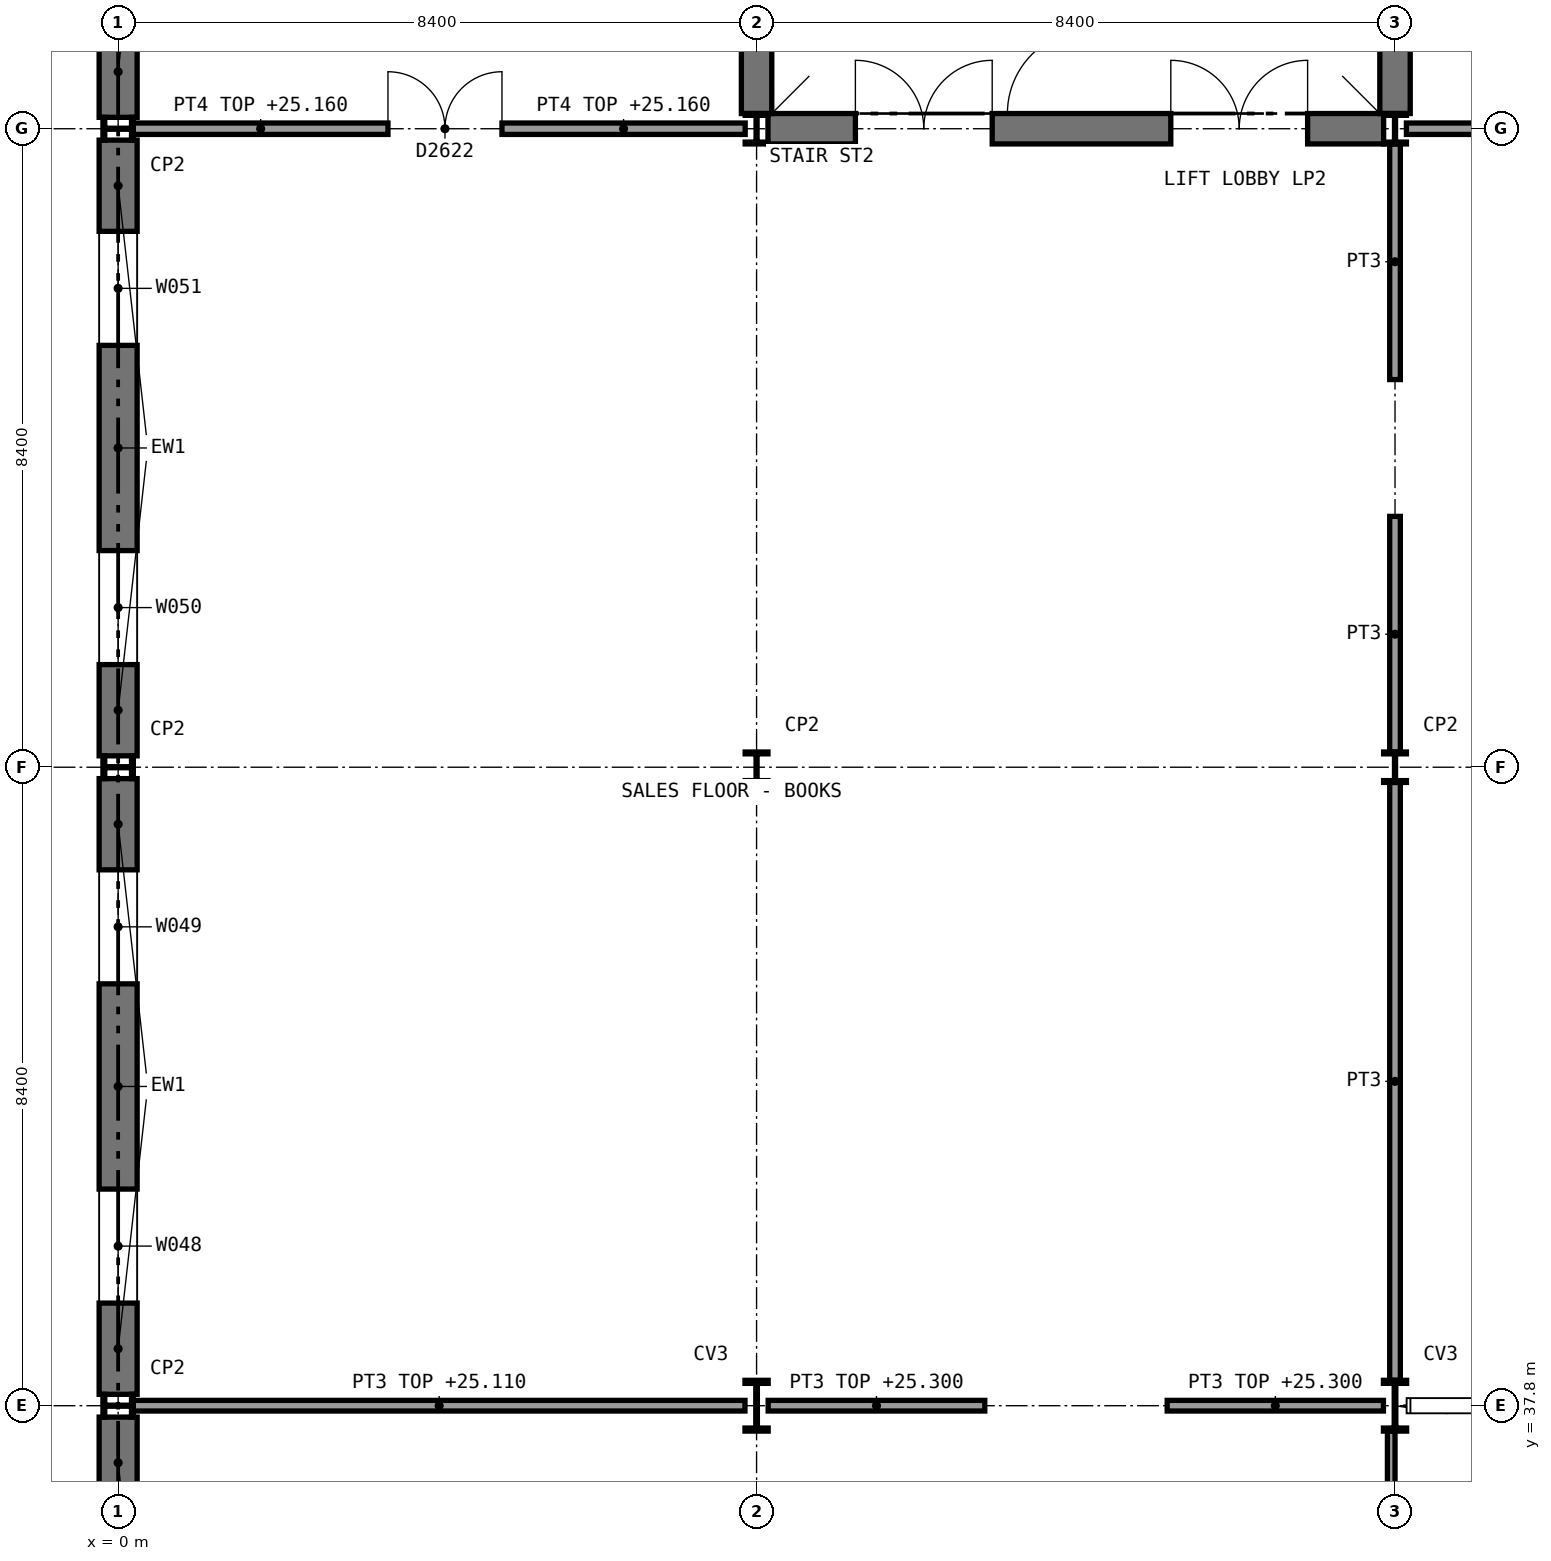
"""IFC4 building model, lengths in metres.
Left out: names, types, materials, properties, quantities, classifications, styles, units other than length and angle.
Written with IfcOpenShell. Run it as: python <this file> out.ifc"""

import sys

from ifc_helpers import new_model, si_unit, direction, frame, frame_2d, origin, origin_2d, place, context, subcontext, project, spatial, rectangle, i_section, extrude, element, fill, save


model = new_model("IFC4")
c1 = context("Model", 3, precision=1e-05, world=origin(), true_north=direction((0.0, 1.0)))
c2 = subcontext(c1, "Body", "Model", "MODEL_VIEW")
j1 = project(units=[si_unit("LENGTHUNIT", "METRE"), si_unit("PLANEANGLEUNIT", "RADIAN")], contexts=[c1])
p1 = place(None, origin())
s1 = spatial("IfcSite", under=j1, at=p1, CompositionType="ELEMENT")
p2 = place(p1, origin())
s2 = spatial("IfcBuilding", under=s1, at=p2, CompositionType="ELEMENT")
p3 = place(p2, frame((0.0, 0.0, 21.0)))
s3 = spatial("IfcBuildingStorey", under=s2, at=p3, CompositionType="ELEMENT", Elevation=21.0)
p4 = place(p3, frame((8.55, 54.6, 0.0), z_axis=(0.0, 0.0, 1.0), x_axis=(1.0, 0.0, 0.0)))
e1 = element("IfcWall", 1, at=p4, inside=s3, PredefinedType="SHEAR", context=c2, shape_type="SweptSolid", body=[
    extrude(rectangle(XDim=8.1, YDim=0.4, at=frame_2d((4.05, 0.0))), origin(), (0.0, 0.0, 1.0), 4.65),
])
p5 = place(p4, frame((1.15, 0.0, 0.0)))
e2 = element("IfcOpeningElement", 2, at=p5, cuts=e1, PredefinedType="OPENING", context=c2, shape_type="SweptSolid", body=[
    extrude(rectangle(XDim=1.8, YDim=2.1, at=frame_2d((0.9, 1.05))), frame((0.0, 0.21, 0.0), z_axis=(0.0, -1.0, 0.0), x_axis=(1.0, 0.0, 0.0)), (0.0, 0.0, 1.0), 0.42),
])
p6 = place(p4, frame((5.3, 0.0, 0.0)))
e3 = element("IfcOpeningElement", 3, at=p6, cuts=e1, PredefinedType="OPENING", context=c2, shape_type="SweptSolid", body=[
    extrude(rectangle(XDim=1.8, YDim=2.1, at=frame_2d((0.9, 1.05))), frame((0.0, 0.21, 0.0), z_axis=(0.0, -1.0, 0.0), x_axis=(1.0, 0.0, 0.0)), (0.0, 0.0, 1.0), 0.42),
])
for number, where, z_axis, x_axis in (
    (4, (8.4, 54.8, 0.0), (0.0, 0.0, 1.0), (0.0, 1.0, 0.0)),
    (5, (16.8, 54.8, 0.0), (0.0, 0.0, 1.0), (0.0, 1.0, 0.0)),
):
    element("IfcWall", number, at=place(p3, frame(where, z_axis=z_axis, x_axis=x_axis)), inside=s3, PredefinedType="SHEAR", context=c2, shape_type="SweptSolid", body=[
        extrude(rectangle(XDim=8.0, YDim=0.4, at=frame_2d((4.0, 0.0))), origin(), (0.0, 0.0, 1.0), 4.65),
    ])
for number, where, z_axis, x_axis in (
    (6, (0.0, 37.8, 0.0), (0.0, 0.0, 1.0), (0.0, 1.0, 0.0)),
    (7, (0.0, 46.2, 0.0), (0.0, 0.0, 1.0), (0.0, 1.0, 0.0)),
    (8, (0.0, 54.6, 0.0), (0.0, 0.0, 1.0), (0.0, 1.0, 0.0)),
):
    element("IfcColumn", number, at=place(p3, frame(where, z_axis=z_axis, x_axis=x_axis)), inside=s3, PredefinedType="COLUMN", context=c2, shape_type="SweptSolid", body=[
        extrude(i_section(OverallWidth=0.3, OverallDepth=0.4, WebThickness=0.013, FlangeThickness=0.024, FilletRadius=0.027, at=origin_2d()), origin(), (0.0, 0.0, 1.0), 4.8),
    ])
p7 = place(p3, frame((8.4, 37.8, 0.0), z_axis=(0.0, 0.0, 1.0), x_axis=(1.0, 0.0, 0.0)))
e9 = element("IfcColumn", 9, at=p7, inside=s3, PredefinedType="COLUMN", context=c2, shape_type="SweptSolid", body=[
    extrude(i_section(OverallWidth=0.305, OverallDepth=0.668, WebThickness=0.021, FlangeThickness=0.04, FilletRadius=0.027, at=origin_2d()), origin(), (0.0, 0.0, 1.0), 4.8),
])
for number, where, z_axis, x_axis in (
    (10, (8.4, 46.2, 0.0), (0.0, 0.0, 1.0), (1.0, 0.0, 0.0)),
    (11, (8.4, 54.6, 0.0), (0.0, 0.0, 1.0), (1.0, 0.0, 0.0)),
):
    element("IfcColumn", number, at=place(p3, frame(where, z_axis=z_axis, x_axis=x_axis)), inside=s3, PredefinedType="COLUMN", context=c2, shape_type="SweptSolid", body=[
        extrude(i_section(OverallWidth=0.3, OverallDepth=0.4, WebThickness=0.013, FlangeThickness=0.024, FilletRadius=0.027, at=origin_2d()), origin(), (0.0, 0.0, 1.0), 4.8),
    ])
p8 = place(p3, frame((16.8, 37.8, 0.0), z_axis=(0.0, 0.0, 1.0), x_axis=(1.0, 0.0, 0.0)))
e12 = element("IfcColumn", 12, at=p8, inside=s3, PredefinedType="COLUMN", context=c2, shape_type="SweptSolid", body=[
    extrude(i_section(OverallWidth=0.305, OverallDepth=0.668, WebThickness=0.021, FlangeThickness=0.04, FilletRadius=0.027, at=origin_2d()), origin(), (0.0, 0.0, 1.0), 4.8),
])
for number, where, z_axis, x_axis in (
    (13, (16.8, 46.2, 0.0), (0.0, 0.0, 1.0), (1.0, 0.0, 0.0)),
    (14, (16.8, 54.6, 0.0), (0.0, 0.0, 1.0), (1.0, 0.0, 0.0)),
):
    element("IfcColumn", number, at=place(p3, frame(where, z_axis=z_axis, x_axis=x_axis)), inside=s3, PredefinedType="COLUMN", context=c2, shape_type="SweptSolid", body=[
        extrude(i_section(OverallWidth=0.3, OverallDepth=0.4, WebThickness=0.013, FlangeThickness=0.024, FilletRadius=0.027, at=origin_2d()), origin(), (0.0, 0.0, 1.0), 4.8),
    ])
p9 = place(p3, frame((16.95, 54.6, 0.0), z_axis=(0.0, 0.0, 1.0), x_axis=(1.0, 0.0, 0.0)))
e15 = element("IfcWall", 15, at=p9, inside=s3, PredefinedType="SOLIDWALL", context=c2, shape_type="SweptSolid", body=[
    extrude(rectangle(XDim=8.1, YDim=0.15, at=frame_2d((4.05, 0.0))), origin(), (0.0, 0.0, 1.0), 4.3),
])
p10 = place(p9, frame((3.35, 0.0, 0.0)))
e16 = element("IfcOpeningElement", 16, at=p10, cuts=e15, PredefinedType="OPENING", context=c2, shape_type="SweptSolid", body=[
    extrude(rectangle(XDim=1.5, YDim=2.1, at=frame_2d((0.75, 1.05))), frame((0.0, 0.085, 0.0), z_axis=(0.0, -1.0, 0.0), x_axis=(1.0, 0.0, 0.0)), (0.0, 0.0, 1.0), 0.17),
])
p11 = place(p3, frame((0.2, 54.6, 0.0), z_axis=(0.0, 0.0, 1.0), x_axis=(1.0, 0.0, 0.0)))
e17 = element("IfcWall", 17, at=p11, inside=s3, PredefinedType="SOLIDWALL", context=c2, shape_type="SweptSolid", body=[
    extrude(rectangle(XDim=8.05, YDim=0.15, at=frame_2d((4.025, 0.0))), origin(), (0.0, 0.0, 1.0), 4.16),
])
p12 = place(p11, frame((3.35, 0.0, 0.0)))
e18 = element("IfcOpeningElement", 18, at=p12, cuts=e17, PredefinedType="OPENING", context=c2, shape_type="SweptSolid", body=[
    extrude(rectangle(XDim=1.5, YDim=2.1, at=frame_2d((0.75, 1.05))), frame((0.0, 0.085, 0.0), z_axis=(0.0, -1.0, 0.0), x_axis=(1.0, 0.0, 0.0)), (0.0, 0.0, 1.0), 0.17),
])
p13 = place(p3, frame((16.8, 38.134, 0.0), z_axis=(0.0, 0.0, 1.0), x_axis=(0.0, 1.0, 0.0)))
e19 = element("IfcWall", 19, at=p13, inside=s3, PredefinedType="PARTITIONING", context=c2, shape_type="SweptSolid", body=[
    extrude(rectangle(XDim=7.866, YDim=0.14, at=frame_2d((3.933, 0.0))), origin(), (0.0, 0.0, 1.0), 4.16),
])
for number, where, z_axis, x_axis in (
    (20, (16.8, 46.4, 0.0), (0.0, 0.0, 1.0), (0.0, 1.0, 0.0)),
    (21, (16.8, 51.3, 0.0), (0.0, 0.0, 1.0), (0.0, 1.0, 0.0)),
):
    element("IfcWall", number, at=place(p3, frame(where, z_axis=z_axis, x_axis=x_axis)), inside=s3, PredefinedType="PARTITIONING", context=c2, shape_type="SweptSolid", body=[
        extrude(rectangle(XDim=3.1, YDim=0.14, at=frame_2d((1.55, 0.0))), origin(), (0.0, 0.0, 1.0), 4.16),
    ])
p14 = place(p3, frame((0.2, 37.8, 0.0), z_axis=(0.0, 0.0, 1.0), x_axis=(1.0, 0.0, 0.0)))
e22 = element("IfcWall", 22, at=p14, inside=s3, PredefinedType="PARTITIONING", context=c2, shape_type="SweptSolid", body=[
    extrude(rectangle(XDim=8.047, YDim=0.14, at=frame_2d((4.024, 0.0))), origin(), (0.0, 0.0, 1.0), 4.11),
])
p15 = place(p3, frame((8.552, 37.8, 0.0), z_axis=(0.0, 0.0, 1.0), x_axis=(1.0, 0.0, 0.0)))
e23 = element("IfcWall", 23, at=p15, inside=s3, PredefinedType="PARTITIONING", context=c2, shape_type="SweptSolid", body=[
    extrude(rectangle(XDim=2.85, YDim=0.14, at=frame_2d((1.425, 0.0))), origin(), (0.0, 0.0, 1.0), 4.3),
])
p16 = place(p3, frame((13.802, 37.8, 0.0), z_axis=(0.0, 0.0, 1.0), x_axis=(1.0, 0.0, 0.0)))
e24 = element("IfcWall", 24, at=p16, inside=s3, PredefinedType="PARTITIONING", context=c2, shape_type="SweptSolid", body=[
    extrude(rectangle(XDim=2.845, YDim=0.14, at=frame_2d((1.422, 0.0))), origin(), (0.0, 0.0, 1.0), 4.3),
])
p17 = place(p3, frame((0.0, 25.35, 0.0), z_axis=(0.0, 0.0, 1.0), x_axis=(0.0, 1.0, 0.0)))
e25 = element("IfcWall", 25, at=p17, inside=s3, PredefinedType="STANDARD", context=c2, shape_type="SweptSolid", body=[
    extrude(rectangle(XDim=12.3, YDim=0.5, at=frame_2d((6.15, 0.0))), origin(), (0.0, 0.0, 1.0), 4.65),
])
p18 = place(p17, frame((1.2, 0.0, 1.0)))
e26 = element("IfcOpeningElement", 26, at=p18, cuts=e25, PredefinedType="OPENING", context=c2, shape_type="SweptSolid", body=[
    extrude(rectangle(XDim=1.5, YDim=2.4, at=frame_2d((0.75, 1.2))), frame((0.0, 0.26, 0.0), z_axis=(0.0, -1.0, 0.0), x_axis=(1.0, 0.0, 0.0)), (0.0, 0.0, 1.0), 0.52),
])
p19 = place(p17, frame((5.4, 0.0, 1.0)))
e27 = element("IfcOpeningElement", 27, at=p19, cuts=e25, PredefinedType="OPENING", context=c2, shape_type="SweptSolid", body=[
    extrude(rectangle(XDim=1.5, YDim=2.4, at=frame_2d((0.75, 1.2))), frame((0.0, 0.26, 0.0), z_axis=(0.0, -1.0, 0.0), x_axis=(1.0, 0.0, 0.0)), (0.0, 0.0, 1.0), 0.52),
])
p20 = place(p17, frame((9.6, 0.0, 1.0)))
e28 = element("IfcOpeningElement", 28, at=p20, cuts=e25, PredefinedType="OPENING", context=c2, shape_type="SweptSolid", body=[
    extrude(rectangle(XDim=1.5, YDim=2.4, at=frame_2d((0.75, 1.2))), frame((0.0, 0.26, 0.0), z_axis=(0.0, -1.0, 0.0), x_axis=(1.0, 0.0, 0.0)), (0.0, 0.0, 1.0), 0.52),
])
p21 = place(p3, frame((0.0, 37.95, 0.0), z_axis=(0.0, 0.0, 1.0), x_axis=(0.0, 1.0, 0.0)))
e29 = element("IfcWall", 29, at=p21, inside=s3, PredefinedType="STANDARD", context=c2, shape_type="SweptSolid", body=[
    extrude(rectangle(XDim=8.1, YDim=0.5, at=frame_2d((4.05, 0.0))), origin(), (0.0, 0.0, 1.0), 4.65),
])
p22 = place(p21, frame((1.2, 0.0, 1.0)))
e30 = element("IfcOpeningElement", 30, at=p22, cuts=e29, PredefinedType="OPENING", context=c2, shape_type="SweptSolid", body=[
    extrude(rectangle(XDim=1.5, YDim=2.4, at=frame_2d((0.75, 1.2))), frame((0.0, 0.26, 0.0), z_axis=(0.0, -1.0, 0.0), x_axis=(1.0, 0.0, 0.0)), (0.0, 0.0, 1.0), 0.52),
])
p23 = place(p21, frame((5.4, 0.0, 1.0)))
e31 = element("IfcOpeningElement", 31, at=p23, cuts=e29, PredefinedType="OPENING", context=c2, shape_type="SweptSolid", body=[
    extrude(rectangle(XDim=1.5, YDim=2.4, at=frame_2d((0.75, 1.2))), frame((0.0, 0.26, 0.0), z_axis=(0.0, -1.0, 0.0), x_axis=(1.0, 0.0, 0.0)), (0.0, 0.0, 1.0), 0.52),
])
p24 = place(p3, frame((0.0, 46.35, 0.0), z_axis=(0.0, 0.0, 1.0), x_axis=(0.0, 1.0, 0.0)))
e32 = element("IfcWall", 32, at=p24, inside=s3, PredefinedType="STANDARD", context=c2, shape_type="SweptSolid", body=[
    extrude(rectangle(XDim=8.1, YDim=0.5, at=frame_2d((4.05, 0.0))), origin(), (0.0, 0.0, 1.0), 4.65),
])
p25 = place(p24, frame((1.2, 0.0, 1.0)))
e33 = element("IfcOpeningElement", 33, at=p25, cuts=e32, PredefinedType="OPENING", context=c2, shape_type="SweptSolid", body=[
    extrude(rectangle(XDim=1.5, YDim=2.4, at=frame_2d((0.75, 1.2))), frame((0.0, 0.26, 0.0), z_axis=(0.0, -1.0, 0.0), x_axis=(1.0, 0.0, 0.0)), (0.0, 0.0, 1.0), 0.52),
])
p26 = place(p24, frame((5.4, 0.0, 1.0)))
e34 = element("IfcOpeningElement", 34, at=p26, cuts=e32, PredefinedType="OPENING", context=c2, shape_type="SweptSolid", body=[
    extrude(rectangle(XDim=1.5, YDim=2.4, at=frame_2d((0.75, 1.2))), frame((0.0, 0.26, 0.0), z_axis=(0.0, -1.0, 0.0), x_axis=(1.0, 0.0, 0.0)), (0.0, 0.0, 1.0), 0.52),
])
p27 = place(p3, frame((0.0, 54.75, 0.0), z_axis=(0.0, 0.0, 1.0), x_axis=(0.0, 1.0, 0.0)))
e35 = element("IfcWall", 35, at=p27, inside=s3, PredefinedType="STANDARD", context=c2, shape_type="SweptSolid", body=[
    extrude(rectangle(XDim=8.1, YDim=0.5, at=frame_2d((4.05, 0.0))), origin(), (0.0, 0.0, 1.0), 4.65),
])
p28 = place(p27, frame((1.2, 0.0, 1.0)))
e36 = element("IfcOpeningElement", 36, at=p28, cuts=e35, PredefinedType="OPENING", context=c2, shape_type="SweptSolid", body=[
    extrude(rectangle(XDim=1.5, YDim=2.4, at=frame_2d((0.75, 1.2))), frame((0.0, 0.26, 0.0), z_axis=(0.0, -1.0, 0.0), x_axis=(1.0, 0.0, 0.0)), (0.0, 0.0, 1.0), 0.52),
])
p29 = place(p27, frame((5.4, 0.0, 1.0)))
e37 = element("IfcOpeningElement", 37, at=p29, cuts=e35, PredefinedType="OPENING", context=c2, shape_type="SweptSolid", body=[
    extrude(rectangle(XDim=1.5, YDim=2.4, at=frame_2d((0.75, 1.2))), frame((0.0, 0.26, 0.0), z_axis=(0.0, -1.0, 0.0), x_axis=(1.0, 0.0, 0.0)), (0.0, 0.0, 1.0), 0.52),
])
p30 = place(p3, frame((12.8, 62.8, 0.0), z_axis=(0.0, 0.0, 1.0), x_axis=(0.0, -1.0, 0.0)))
e38 = element("IfcWall", 38, at=p30, inside=s3, PredefinedType="SHEAR", context=c2, shape_type="SweptSolid", body=[
    extrude(rectangle(XDim=8.0, YDim=0.2, at=frame_2d((4.0, 0.0))), origin(), (0.0, 0.0, 1.0), 4.65),
])
p31 = place(p30, frame((6.9, 0.0, 0.0)))
e39 = element("IfcOpeningElement", 39, at=p31, cuts=e38, PredefinedType="OPENING", context=c2, shape_type="SweptSolid", body=[
    extrude(rectangle(XDim=1.11, YDim=2.1, at=frame_2d((0.555, 1.05))), frame((0.0, 0.11, 0.0), z_axis=(0.0, -1.0, 0.0), x_axis=(1.0, 0.0, 0.0)), (0.0, 0.0, 1.0), 0.22),
])
p32 = place(p3, frame((16.75, 25.534, 0.0), z_axis=(0.0, 0.0, 1.0), x_axis=(0.0, 1.0, 0.0)))
e40 = element("IfcWall", 40, at=p32, inside=s3, PredefinedType="PARTITIONING", context=c2, shape_type="SweptSolid", body=[
    extrude(rectangle(XDim=11.932, YDim=0.1, at=frame_2d((5.966, 0.0))), origin(), (0.0, 0.0, 1.0), 3.76),
])
p33 = place(p12, origin())
e41 = element("IfcDoor", 41, at=p33, inside=s3, OperationType="DOUBLE_DOOR_SINGLE_SWING", PredefinedType="DOOR", context=c2, shape_type="SweptSolid", body=[
    extrude(rectangle(XDim=1.5, YDim=2.1, at=frame_2d((0.75, 1.05))), frame((0.0, 0.025, 0.0), z_axis=(0.0, -1.0, 0.0), x_axis=(1.0, 0.0, 0.0)), (0.0, 0.0, 1.0), 0.05),
])
fill(e18, e41)
p34 = place(p22, origin())
e42 = element("IfcWindow", 42, at=p34, inside=s3, PartitioningType="SINGLE_PANEL", PredefinedType="WINDOW", context=c2, shape_type="SweptSolid", body=[
    extrude(rectangle(XDim=1.5, YDim=2.4, at=frame_2d((0.75, 1.2))), frame((0.0, 0.03, 0.0), z_axis=(0.0, -1.0, 0.0), x_axis=(1.0, 0.0, 0.0)), (0.0, 0.0, 1.0), 0.06),
])
fill(e30, e42)
p35 = place(p23, origin())
e43 = element("IfcWindow", 43, at=p35, inside=s3, PartitioningType="SINGLE_PANEL", PredefinedType="WINDOW", context=c2, shape_type="SweptSolid", body=[
    extrude(rectangle(XDim=1.5, YDim=2.4, at=frame_2d((0.75, 1.2))), frame((0.0, 0.03, 0.0), z_axis=(0.0, -1.0, 0.0), x_axis=(1.0, 0.0, 0.0)), (0.0, 0.0, 1.0), 0.06),
])
fill(e31, e43)
p36 = place(p25, origin())
e44 = element("IfcWindow", 44, at=p36, inside=s3, PartitioningType="SINGLE_PANEL", PredefinedType="WINDOW", context=c2, shape_type="SweptSolid", body=[
    extrude(rectangle(XDim=1.5, YDim=2.4, at=frame_2d((0.75, 1.2))), frame((0.0, 0.03, 0.0), z_axis=(0.0, -1.0, 0.0), x_axis=(1.0, 0.0, 0.0)), (0.0, 0.0, 1.0), 0.06),
])
fill(e33, e44)
p37 = place(p26, origin())
e45 = element("IfcWindow", 45, at=p37, inside=s3, PartitioningType="SINGLE_PANEL", PredefinedType="WINDOW", context=c2, shape_type="SweptSolid", body=[
    extrude(rectangle(XDim=1.5, YDim=2.4, at=frame_2d((0.75, 1.2))), frame((0.0, 0.03, 0.0), z_axis=(0.0, -1.0, 0.0), x_axis=(1.0, 0.0, 0.0)), (0.0, 0.0, 1.0), 0.06),
])
fill(e34, e45)
p38 = place(p31, frame((1.1, 0.0, 0.0), z_axis=(0.0, 0.0, 1.0), x_axis=(-1.0, 0.0, 0.0)))
e46 = element("IfcDoor", 46, at=p38, inside=s3, OperationType="SINGLE_SWING_LEFT", PredefinedType="DOOR", context=c2, shape_type="SweptSolid", body=[
    extrude(rectangle(XDim=1.1, YDim=2.1, at=frame_2d((0.55, 1.05))), frame((0.0, 0.025, 0.0), z_axis=(0.0, -1.0, 0.0), x_axis=(1.0, 0.0, 0.0)), (0.0, 0.0, 1.0), 0.05),
])
fill(e39, e46)
p39 = place(p5, origin())
e47 = element("IfcDoor", 47, at=p39, inside=s3, OperationType="DOUBLE_DOOR_SINGLE_SWING", PredefinedType="DOOR", context=c2, shape_type="SweptSolid", body=[
    extrude(rectangle(XDim=1.8, YDim=2.1, at=frame_2d((0.9, 1.05))), frame((0.0, 0.025, 0.0), z_axis=(0.0, -1.0, 0.0), x_axis=(1.0, 0.0, 0.0)), (0.0, 0.0, 1.0), 0.05),
])
fill(e2, e47)
p40 = place(p6, origin())
e48 = element("IfcDoor", 48, at=p40, inside=s3, OperationType="DOUBLE_DOOR_SINGLE_SWING", PredefinedType="DOOR", context=c2, shape_type="SweptSolid", body=[
    extrude(rectangle(XDim=1.8, YDim=2.1, at=frame_2d((0.9, 1.05))), frame((0.0, 0.025, 0.0), z_axis=(0.0, -1.0, 0.0), x_axis=(1.0, 0.0, 0.0)), (0.0, 0.0, 1.0), 0.05),
])
fill(e3, e48)
save(model, sys.argv[1])
